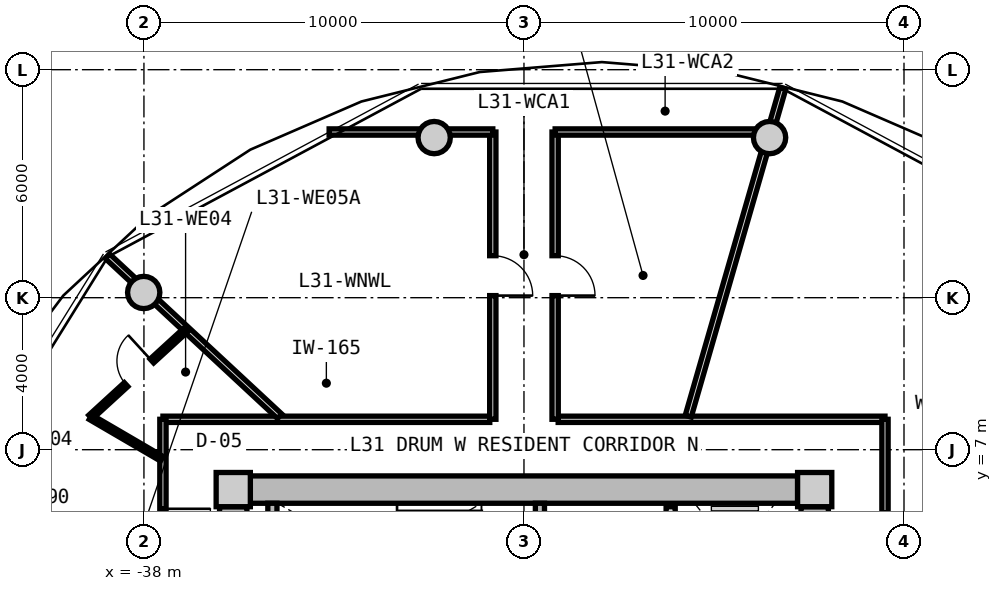
"""IFC4 building model, lengths in metres.
Left out: names, types, materials, properties, quantities, classifications, styles, units other than length and angle.
Written with IfcOpenShell. Run it as: python <this file> out.ifc"""

import sys

from ifc_helpers import new_model, si_unit, direction, frame, frame_2d, origin, origin_2d, place, context, subcontext, project, spatial, rectangle, circle, extrude, source, transform, mapped, element, fill, save


model = new_model("IFC4")
c1 = context("Model", 3, precision=1e-05, world=origin(), true_north=direction((0.0, 1.0)))
c2 = subcontext(c1, "Body", "Model", "MODEL_VIEW")
j1 = project(units=[si_unit("LENGTHUNIT", "METRE"), si_unit("PLANEANGLEUNIT", "RADIAN")], contexts=[c1])
p1 = place(None, origin())
s1 = spatial("IfcSite", under=j1, at=p1, CompositionType="ELEMENT")
p2 = place(p1, origin())
s2 = spatial("IfcBuilding", under=s1, at=p2, CompositionType="ELEMENT")
p3 = place(p2, frame((0.0, 0.0, 102.35)))
s3 = spatial("IfcBuildingStorey", under=s2, at=p3, CompositionType="ELEMENT", Elevation=102.35)
m1 = source(origin(), c2, "Body", "SweptSolid", [
    extrude(rectangle(XDim=0.9, YDim=0.9, at=origin_2d()), origin(), (0.0, 0.0, 1.0), 3.05),
])
for number, where, z_axis, x_axis in (
    (1, (-20.35, 5.95, 0.0), (0.0, 0.0, 1.0), (1.0, 0.0, 0.0)),
    (2, (-35.65, 5.95, 0.0), (0.0, 0.0, 1.0), (1.0, 0.0, 0.0)),
):
    element("IfcColumn", number, at=place(p3, frame(where, z_axis=z_axis, x_axis=x_axis)), inside=s3, PredefinedType="COLUMN", context=c2, shape_type="MappedRepresentation", body=[
        mapped(m1, transform((0.0, 0.0, 0.0), x_axis=(1.0, 0.0, 0.0), y_axis=(0.0, 1.0, 0.0), z_axis=(0.0, 0.0, 1.0), scale=1.0)),
    ])
m2 = source(origin(), c2, "Body", "SweptSolid", [
    extrude(rectangle(XDim=14.4, YDim=0.72, at=frame_2d((7.2, 0.0))), origin(), (0.0, 0.0, 1.0), 2.79),
])
p4 = place(p3, frame((-35.2, 5.95, 0.0), z_axis=(0.0, 0.0, 1.0), x_axis=(1.0, 0.0, 0.0)))
e3 = element("IfcWall", 3, at=p4, inside=s3, PredefinedType="SHEAR", context=c2, shape_type="MappedRepresentation", body=[
    mapped(m2, transform((0.0, 0.0, 0.0), x_axis=(1.0, 0.0, 0.0), y_axis=(0.0, 1.0, 0.0), z_axis=(0.0, 0.0, 1.0), scale=1.0)),
])
m3 = source(origin(), c2, "Body", "SweptSolid", [
    extrude(rectangle(XDim=11.0, YDim=0.72, at=frame_2d((5.5, 0.0))), origin(), (0.0, 0.0, 1.0), 2.79),
])
p5 = place(p3, frame((-35.65, -5.5, 0.0), z_axis=(0.0, 0.0, 1.0), x_axis=(0.0, 1.0, 0.0)))
e4 = element("IfcWall", 4, at=p5, inside=s3, PredefinedType="SHEAR", context=c2, shape_type="MappedRepresentation", body=[
    mapped(m3, transform((0.0, 0.0, 0.0), x_axis=(1.0, 0.0, 0.0), y_axis=(0.0, 1.0, 0.0), z_axis=(0.0, 0.0, 1.0), scale=1.0)),
])
p6 = place(p5, frame((3.8, 0.0, 0.0)))
e5 = element("IfcOpeningElement", 5, at=p6, cuts=e4, PredefinedType="OPENING", context=c2, shape_type="SweptSolid", body=[
    extrude(rectangle(XDim=1.2, YDim=2.15, at=frame_2d((0.6, 1.075))), frame((0.0, 0.37, 0.0), z_axis=(0.0, -1.0, 0.0), x_axis=(1.0, 0.0, 0.0)), (0.0, 0.0, 1.0), 0.74),
])
p7 = place(p3, frame((-20.35, 5.5, 0.0), z_axis=(0.0, 0.0, 1.0), x_axis=(0.0, -1.0, 0.0)))
e6 = element("IfcWall", 6, at=p7, inside=s3, PredefinedType="SHEAR", context=c2, shape_type="MappedRepresentation", body=[
    mapped(m3, transform((0.0, 0.0, 0.0), x_axis=(1.0, 0.0, 0.0), y_axis=(0.0, 1.0, 0.0), z_axis=(0.0, 0.0, 1.0), scale=1.0)),
])
p8 = place(p7, frame((5.65, 0.0, 0.0)))
e7 = element("IfcOpeningElement", 7, at=p8, cuts=e6, PredefinedType="OPENING", context=c2, shape_type="SweptSolid", body=[
    extrude(rectangle(XDim=1.2, YDim=2.15, at=frame_2d((0.6, 1.075))), frame((0.0, 0.37, 0.0), z_axis=(0.0, -1.0, 0.0), x_axis=(1.0, 0.0, 0.0)), (0.0, 0.0, 1.0), 0.74),
])
m4 = source(origin(), c2, "Body", "SweptSolid", [
    extrude(circle(Radius=0.425, at=origin_2d()), origin(), (0.0, 0.0, 1.0), 3.05),
])
for number, where, z_axis, x_axis in (
    (8, (-21.537, 15.213, 0.0), (0.0, 0.0, 1.0), (1.0, 0.0, 0.0)),
    (9, (-30.363, 15.213, 0.0), (0.0, 0.0, 1.0), (1.0, 0.0, 0.0)),
    (10, (-38.006, 11.137, 0.0), (0.0, 0.0, 1.0), (1.0, 0.0, 0.0)),
):
    element("IfcColumn", number, at=place(p3, frame(where, z_axis=z_axis, x_axis=x_axis)), inside=s3, PredefinedType="COLUMN", context=c2, shape_type="MappedRepresentation", body=[
        mapped(m4, transform((0.0, 0.0, 0.0), x_axis=(1.0, 0.0, 0.0), y_axis=(0.0, 1.0, 0.0), z_axis=(0.0, 0.0, 1.0), scale=1.0)),
    ])
m5 = source(origin(), c2, "Body", "SweptSolid", [
    extrude(rectangle(XDim=3.14, YDim=0.24, at=frame_2d((1.57, 0.0))), origin(), (0.0, 0.0, 1.0), 2.79),
])
p9 = place(p3, frame((-34.62, 2.45, 0.0), z_axis=(0.0, 0.0, 1.0), x_axis=(0.0, 1.0, 0.0)))
e11 = element("IfcWall", 11, at=p9, inside=s3, PredefinedType="PARTITIONING", context=c2, shape_type="MappedRepresentation", body=[
    mapped(m5, transform((0.0, 0.0, 0.0), x_axis=(1.0, 0.0, 0.0), y_axis=(0.0, 1.0, 0.0), z_axis=(0.0, 0.0, 1.0), scale=1.0)),
])
p10 = place(p3, frame((-27.58, 2.45, 0.0), z_axis=(0.0, 0.0, 1.0), x_axis=(0.0, 1.0, 0.0)))
e12 = element("IfcWall", 12, at=p10, inside=s3, PredefinedType="PARTITIONING", context=c2, shape_type="MappedRepresentation", body=[
    mapped(m5, transform((0.0, 0.0, 0.0), x_axis=(1.0, 0.0, 0.0), y_axis=(0.0, 1.0, 0.0), z_axis=(0.0, 0.0, 1.0), scale=1.0)),
])
p11 = place(p10, frame((0.55, 0.0, 0.0)))
e13 = element("IfcOpeningElement", 13, at=p11, cuts=e12, PredefinedType="OPENING", context=c2, shape_type="SweptSolid", body=[
    extrude(rectangle(XDim=1.1, YDim=2.15, at=frame_2d((0.55, 1.075))), frame((0.0, 0.13, 0.0), z_axis=(0.0, -1.0, 0.0), x_axis=(1.0, 0.0, 0.0)), (0.0, 0.0, 1.0), 0.26),
])
m6 = source(origin(), c2, "Body", "SweptSolid", [
    extrude(rectangle(XDim=5.0, YDim=0.24, at=frame_2d((2.5, 0.0))), origin(), (0.0, 0.0, 1.0), 2.775),
])
p12 = place(p3, frame((-24.14, 0.5, 0.0), z_axis=(0.0, 0.0, 1.0), x_axis=(0.0, 1.0, 0.0)))
e14 = element("IfcWall", 14, at=p12, inside=s3, PredefinedType="PARTITIONING", context=c2, shape_type="MappedRepresentation", body=[
    mapped(m6, transform((0.0, 0.0, 0.0), x_axis=(1.0, 0.0, 0.0), y_axis=(0.0, 1.0, 0.0), z_axis=(0.0, 0.0, 1.0), scale=1.0)),
])
p13 = place(p12, frame((3.05, 0.0, 0.0)))
e15 = element("IfcOpeningElement", 15, at=p13, cuts=e14, PredefinedType="OPENING", context=c2, shape_type="SweptSolid", body=[
    extrude(rectangle(XDim=1.3, YDim=2.2, at=frame_2d((0.65, 1.1))), frame((0.0, 0.13, 0.0), z_axis=(0.0, -1.0, 0.0), x_axis=(1.0, 0.0, 0.0)), (0.0, 0.0, 1.0), 0.26),
])
p14 = place(p12, frame((0.55, 0.0, 0.0)))
e16 = element("IfcOpeningElement", 16, at=p14, cuts=e14, PredefinedType="OPENING", context=c2, shape_type="SweptSolid", body=[
    extrude(rectangle(XDim=1.3, YDim=2.2, at=frame_2d((0.65, 1.1))), frame((0.0, 0.13, 0.0), z_axis=(0.0, -1.0, 0.0), x_axis=(1.0, 0.0, 0.0)), (0.0, 0.0, 1.0), 0.26),
])
m7 = source(origin(), c2, "Body", "SweptSolid", [
    extrude(rectangle(XDim=8.6, YDim=0.165, at=frame_2d((4.3, 0.0))), origin(), (0.0, 0.0, 1.0), 2.775),
])
for number, where, z_axis, x_axis in (
    (17, (-37.5, 7.8, 0.0), (0.0, 0.0, 1.0), (1.0, 0.0, 0.0)),
    (18, (-27.1, 7.8, 0.0), (0.0, 0.0, 1.0), (1.0, 0.0, 0.0)),
):
    element("IfcWall", number, at=place(p3, frame(where, z_axis=z_axis, x_axis=x_axis)), inside=s3, PredefinedType="PARTITIONING", context=c2, shape_type="MappedRepresentation", body=[
        mapped(m7, transform((0.0, 0.0, 0.0), x_axis=(1.0, 0.0, 0.0), y_axis=(0.0, 1.0, 0.0), z_axis=(0.0, 0.0, 1.0), scale=1.0)),
    ])
m8 = source(origin(), c2, "Body", "SweptSolid", [
    extrude(rectangle(XDim=15.6, YDim=0.165, at=frame_2d((7.8, 0.0))), origin(), (0.0, 0.0, 1.0), 2.775),
])
p15 = place(p3, frame((-37.5, -7.8, 0.0), z_axis=(0.0, 0.0, 1.0), x_axis=(0.0, 1.0, 0.0)))
e19 = element("IfcWall", 19, at=p15, inside=s3, PredefinedType="PARTITIONING", context=c2, shape_type="MappedRepresentation", body=[
    mapped(m8, transform((0.0, 0.0, 0.0), x_axis=(1.0, 0.0, 0.0), y_axis=(0.0, 1.0, 0.0), z_axis=(0.0, 0.0, 1.0), scale=1.0)),
])
p16 = place(p15, frame((11.994, 0.0, 0.0)))
e20 = element("IfcOpeningElement", 20, at=p16, cuts=e19, PredefinedType="OPENING", context=c2, shape_type="SweptSolid", body=[
    extrude(rectangle(XDim=1.25, YDim=2.2, at=frame_2d((0.625, 1.1))), frame((0.0, 0.093, 0.0), z_axis=(0.0, -1.0, 0.0), x_axis=(1.0, 0.0, 0.0)), (0.0, 0.0, 1.0), 0.185),
])
p17 = place(p15, frame((7.984, 0.0, 0.0)))
e21 = element("IfcOpeningElement", 21, at=p17, cuts=e19, PredefinedType="OPENING", context=c2, shape_type="SweptSolid", body=[
    extrude(rectangle(XDim=1.05, YDim=2.15, at=frame_2d((0.525, 1.075))), frame((0.0, 0.093, 0.0), z_axis=(0.0, -1.0, 0.0), x_axis=(1.0, 0.0, 0.0)), (0.0, 0.0, 1.0), 0.185),
])
p18 = place(p15, frame((5.777, 0.0, 0.0)))
e22 = element("IfcOpeningElement", 22, at=p18, cuts=e19, PredefinedType="OPENING", context=c2, shape_type="SweptSolid", body=[
    extrude(rectangle(XDim=1.05, YDim=2.15, at=frame_2d((0.525, 1.075))), frame((0.0, 0.093, 0.0), z_axis=(0.0, -1.0, 0.0), x_axis=(1.0, 0.0, 0.0)), (0.0, 0.0, 1.0), 0.185),
])
p19 = place(p3, frame((-18.5, 7.8, 0.0), z_axis=(0.0, 0.0, 1.0), x_axis=(0.0, -1.0, 0.0)))
e23 = element("IfcWall", 23, at=p19, inside=s3, PredefinedType="PARTITIONING", context=c2, shape_type="MappedRepresentation", body=[
    mapped(m8, transform((0.0, 0.0, 0.0), x_axis=(1.0, 0.0, 0.0), y_axis=(0.0, 1.0, 0.0), z_axis=(0.0, 0.0, 1.0), scale=1.0)),
])
p20 = place(p19, frame((12.002, 0.0, 0.0)))
e24 = element("IfcOpeningElement", 24, at=p20, cuts=e23, PredefinedType="OPENING", context=c2, shape_type="SweptSolid", body=[
    extrude(rectangle(XDim=1.05, YDim=2.15, at=frame_2d((0.525, 1.075))), frame((0.0, 0.093, 0.0), z_axis=(0.0, -1.0, 0.0), x_axis=(1.0, 0.0, 0.0)), (0.0, 0.0, 1.0), 0.185),
])
p21 = place(p19, frame((10.211, 0.0, 0.0)))
e25 = element("IfcOpeningElement", 25, at=p21, cuts=e23, PredefinedType="OPENING", context=c2, shape_type="SweptSolid", body=[
    extrude(rectangle(XDim=1.05, YDim=2.15, at=frame_2d((0.525, 1.075))), frame((0.0, 0.093, 0.0), z_axis=(0.0, -1.0, 0.0), x_axis=(1.0, 0.0, 0.0)), (0.0, 0.0, 1.0), 0.185),
])
p22 = place(p19, frame((7.722, 0.0, 0.0)))
e26 = element("IfcOpeningElement", 26, at=p22, cuts=e23, PredefinedType="OPENING", context=c2, shape_type="SweptSolid", body=[
    extrude(rectangle(XDim=1.05, YDim=2.15, at=frame_2d((0.525, 1.075))), frame((0.0, 0.093, 0.0), z_axis=(0.0, -1.0, 0.0), x_axis=(1.0, 0.0, 0.0)), (0.0, 0.0, 1.0), 0.185),
])
p23 = place(p19, frame((6.291, 0.0, 0.0)))
e27 = element("IfcOpeningElement", 27, at=p23, cuts=e23, PredefinedType="OPENING", context=c2, shape_type="SweptSolid", body=[
    extrude(rectangle(XDim=1.05, YDim=2.15, at=frame_2d((0.525, 1.075))), frame((0.0, 0.093, 0.0), z_axis=(0.0, -1.0, 0.0), x_axis=(1.0, 0.0, 0.0)), (0.0, 0.0, 1.0), 0.185),
])
p24 = place(p19, frame((2.465, 0.0, 0.0)))
e28 = element("IfcOpeningElement", 28, at=p24, cuts=e23, PredefinedType="OPENING", context=c2, shape_type="SweptSolid", body=[
    extrude(rectangle(XDim=1.25, YDim=2.2, at=frame_2d((0.625, 1.1))), frame((0.0, 0.093, 0.0), z_axis=(0.0, -1.0, 0.0), x_axis=(1.0, 0.0, 0.0)), (0.0, 0.0, 1.0), 0.185),
])
m9 = source(origin(), c2, "Body", "SweptSolid", [
    extrude(rectangle(XDim=8.989, YDim=0.165, at=frame_2d((4.495, 0.0))), origin(), (0.0, 0.0, 1.0), 2.275),
])
p25 = place(p3, frame((-23.678, 7.88, 0.0), z_axis=(0.0, 0.0, 1.0), x_axis=(0.27702323008, 0.960863221274, 0.0)))
e29 = element("IfcWall", 29, at=p25, inside=s3, PredefinedType="PARTITIONING", context=c2, shape_type="MappedRepresentation", body=[
    mapped(m9, transform((0.0, 0.0, 0.0), x_axis=(1.0, 0.0, 0.0), y_axis=(0.0, 1.0, 0.0), z_axis=(0.0, 0.0, 1.0), scale=1.0)),
])
m10 = source(origin(), c2, "Body", "SweptSolid", [
    extrude(rectangle(XDim=6.187, YDim=0.165, at=frame_2d((3.093, 0.0))), origin(), (0.0, 0.0, 1.0), 2.275),
])
p26 = place(p3, frame((-34.429, 7.88, 0.0), z_axis=(0.0, 0.0, 1.0), x_axis=(-0.732501077882, 0.680765870841, 0.0)))
e30 = element("IfcWall", 30, at=p26, inside=s3, PredefinedType="PARTITIONING", context=c2, shape_type="MappedRepresentation", body=[
    mapped(m10, transform((0.0, 0.0, 0.0), x_axis=(1.0, 0.0, 0.0), y_axis=(0.0, 1.0, 0.0), z_axis=(0.0, 0.0, 1.0), scale=1.0)),
])
m11 = source(origin(), c2, "Body", "SweptSolid", [
    extrude(rectangle(XDim=7.56, YDim=0.165, at=frame_2d((3.78, 0.0))), origin(), (0.0, 0.0, 1.0), 2.775),
])
p27 = place(p3, frame((-28.82, 7.8, 0.0), z_axis=(0.0, 0.0, 1.0), x_axis=(0.0, 1.0, 0.0)))
e31 = element("IfcWall", 31, at=p27, inside=s3, PredefinedType="PARTITIONING", context=c2, shape_type="MappedRepresentation", body=[
    mapped(m11, transform((0.0, 0.0, 0.0), x_axis=(1.0, 0.0, 0.0), y_axis=(0.0, 1.0, 0.0), z_axis=(0.0, 0.0, 1.0), scale=1.0)),
])
p28 = place(p27, frame((3.255, 0.0, 0.0)))
e32 = element("IfcOpeningElement", 32, at=p28, cuts=e31, PredefinedType="OPENING", context=c2, shape_type="SweptSolid", body=[
    extrude(rectangle(XDim=1.05, YDim=2.15, at=frame_2d((0.525, 1.075))), frame((0.0, 0.093, 0.0), z_axis=(0.0, -1.0, 0.0), x_axis=(1.0, 0.0, 0.0)), (0.0, 0.0, 1.0), 0.185),
])
m12 = source(origin(), c2, "Body", "SweptSolid", [
    extrude(rectangle(XDim=4.307, YDim=0.165, at=frame_2d((2.153, 0.0))), origin(), (0.0, 0.0, 1.0), 2.275),
])
p29 = place(p3, frame((-33.127, 15.36, 0.0), z_axis=(0.0, 0.0, 1.0), x_axis=(1.0, 0.0, 0.0)))
e33 = element("IfcWall", 33, at=p29, inside=s3, PredefinedType="PARTITIONING", context=c2, shape_type="MappedRepresentation", body=[
    mapped(m12, transform((0.0, 0.0, 0.0), x_axis=(1.0, 0.0, 0.0), y_axis=(0.0, 1.0, 0.0), z_axis=(0.0, 0.0, 1.0), scale=1.0)),
])
p30 = place(p3, frame((-27.18, 7.8, 0.0), z_axis=(0.0, 0.0, 1.0), x_axis=(0.0, 1.0, 0.0)))
e34 = element("IfcWall", 34, at=p30, inside=s3, PredefinedType="PARTITIONING", context=c2, shape_type="MappedRepresentation", body=[
    mapped(m11, transform((0.0, 0.0, 0.0), x_axis=(1.0, 0.0, 0.0), y_axis=(0.0, 1.0, 0.0), z_axis=(0.0, 0.0, 1.0), scale=1.0)),
])
p31 = place(p30, frame((3.255, 0.0, 0.0)))
e35 = element("IfcOpeningElement", 35, at=p31, cuts=e34, PredefinedType="OPENING", context=c2, shape_type="SweptSolid", body=[
    extrude(rectangle(XDim=1.05, YDim=2.15, at=frame_2d((0.525, 1.075))), frame((0.0, 0.093, 0.0), z_axis=(0.0, -1.0, 0.0), x_axis=(1.0, 0.0, 0.0)), (0.0, 0.0, 1.0), 0.185),
])
m13 = source(origin(), c2, "Body", "SweptSolid", [
    extrude(rectangle(XDim=5.814, YDim=0.165, at=frame_2d((2.907, 0.0))), origin(), (0.0, 0.0, 1.0), 2.275),
])
p32 = place(p3, frame((-27.18, 15.36, 0.0), z_axis=(0.0, 0.0, 1.0), x_axis=(1.0, 0.0, 0.0)))
e36 = element("IfcWall", 36, at=p32, inside=s3, PredefinedType="PARTITIONING", context=c2, shape_type="MappedRepresentation", body=[
    mapped(m13, transform((0.0, 0.0, 0.0), x_axis=(1.0, 0.0, 0.0), y_axis=(0.0, 1.0, 0.0), z_axis=(0.0, 0.0, 1.0), scale=1.0)),
])
m14 = source(origin(), c2, "Body", "SweptSolid", [
    extrude(rectangle(XDim=2.172, YDim=0.14, at=frame_2d((1.086, 0.0))), origin(), (0.0, 0.0, 1.0), 2.775),
])
p33 = place(p3, frame((-37.53, 6.762, 0.0), z_axis=(0.0, 0.0, 1.0), x_axis=(-0.863562702562, 0.504241468688, 0.0)))
e37 = element("IfcWall", 37, at=p33, inside=s3, PredefinedType="PARTITIONING", context=c2, shape_type="MappedRepresentation", body=[
    mapped(m14, transform((0.0, 0.0, 0.0), x_axis=(1.0, 0.0, 0.0), y_axis=(0.0, 1.0, 0.0), z_axis=(0.0, 0.0, 1.0), scale=1.0)),
])
m15 = source(origin(), c2, "Body", "SweptSolid", [
    extrude(rectangle(XDim=3.457, YDim=0.14, at=frame_2d((1.729, 0.0))), origin(), (0.0, 0.0, 1.0), 2.775),
])
p34 = place(p3, frame((-39.405, 7.857, 0.0), z_axis=(0.0, 0.0, 1.0), x_axis=(0.737567375492, 0.675273549467, 0.0)))
e38 = element("IfcWall", 38, at=p34, inside=s3, PredefinedType="PARTITIONING", context=c2, shape_type="MappedRepresentation", body=[
    mapped(m15, transform((0.0, 0.0, 0.0), x_axis=(1.0, 0.0, 0.0), y_axis=(0.0, 1.0, 0.0), z_axis=(0.0, 0.0, 1.0), scale=1.0)),
])
p35 = place(p34, frame((1.268, 0.0, 0.0)))
e39 = element("IfcOpeningElement", 39, at=p35, cuts=e38, PredefinedType="OPENING", context=c2, shape_type="SweptSolid", body=[
    extrude(rectangle(XDim=0.92, YDim=2.1, at=frame_2d((0.46, 1.05))), frame((0.0, 0.08, 0.0), z_axis=(0.0, -1.0, 0.0), x_axis=(1.0, 0.0, 0.0)), (0.0, 0.0, 1.0), 0.16),
])
m16 = source(origin(), c2, "Body", "SweptSolid", [
    extrude(rectangle(XDim=1.05, YDim=2.15, at=frame_2d((0.525, 1.075))), frame((0.0, 0.025, 0.0), z_axis=(0.0, -1.0, 0.0), x_axis=(1.0, 0.0, 0.0)), (0.0, 0.0, 1.0), 0.05),
])
p36 = place(p28, frame((1.05, 0.0, 0.0), z_axis=(0.0, 0.0, 1.0), x_axis=(-1.0, 0.0, 0.0)))
e40 = element("IfcDoor", 40, at=p36, inside=s3, OperationType="SINGLE_SWING_RIGHT", PredefinedType="DOOR", context=c2, shape_type="MappedRepresentation", body=[
    mapped(m16, transform((0.0, 0.0, 0.0), x_axis=(1.0, 0.0, 0.0), y_axis=(0.0, 1.0, 0.0), z_axis=(0.0, 0.0, 1.0), scale=1.0)),
])
fill(e32, e40)
p37 = place(p31, frame((1.05, 0.0, 0.0), z_axis=(0.0, 0.0, 1.0), x_axis=(-1.0, 0.0, 0.0)))
e41 = element("IfcDoor", 41, at=p37, inside=s3, OperationType="SINGLE_SWING_RIGHT", PredefinedType="DOOR", context=c2, shape_type="MappedRepresentation", body=[
    mapped(m16, transform((0.0, 0.0, 0.0), x_axis=(1.0, 0.0, 0.0), y_axis=(0.0, 1.0, 0.0), z_axis=(0.0, 0.0, 1.0), scale=1.0)),
])
fill(e35, e41)
m17 = source(origin(), c2, "Body", "SweptSolid", [
    extrude(rectangle(XDim=1.25, YDim=2.2, at=frame_2d((0.625, 1.1))), frame((0.0, 0.025, 0.0), z_axis=(0.0, -1.0, 0.0), x_axis=(1.0, 0.0, 0.0)), (0.0, 0.0, 1.0), 0.05),
])
p38 = place(p16, frame((1.25, 0.0, 0.0), z_axis=(0.0, 0.0, 1.0), x_axis=(-1.0, 0.0, 0.0)))
e42 = element("IfcDoor", 42, at=p38, inside=s3, OperationType="SINGLE_SWING_LEFT", PredefinedType="DOOR", context=c2, shape_type="MappedRepresentation", body=[
    mapped(m17, transform((0.0, 0.0, 0.0), x_axis=(1.0, 0.0, 0.0), y_axis=(0.0, 1.0, 0.0), z_axis=(0.0, 0.0, 1.0), scale=1.0)),
])
fill(e20, e42)
m18 = source(origin(), c2, "Body", "SweptSolid", [
    extrude(rectangle(XDim=0.92, YDim=2.1, at=frame_2d((0.46, 1.05))), frame((0.0, 0.025, 0.0), z_axis=(0.0, -1.0, 0.0), x_axis=(1.0, 0.0, 0.0)), (0.0, 0.0, 1.0), 0.05),
])
p39 = place(p35, origin())
e43 = element("IfcDoor", 43, at=p39, inside=s3, OperationType="SINGLE_SWING_RIGHT", PredefinedType="DOOR", context=c2, shape_type="MappedRepresentation", body=[
    mapped(m18, transform((0.0, 0.0, 0.0), x_axis=(1.0, 0.0, 0.0), y_axis=(0.0, 1.0, 0.0), z_axis=(0.0, 0.0, 1.0), scale=1.0)),
])
fill(e39, e43)
save(model, sys.argv[1])
